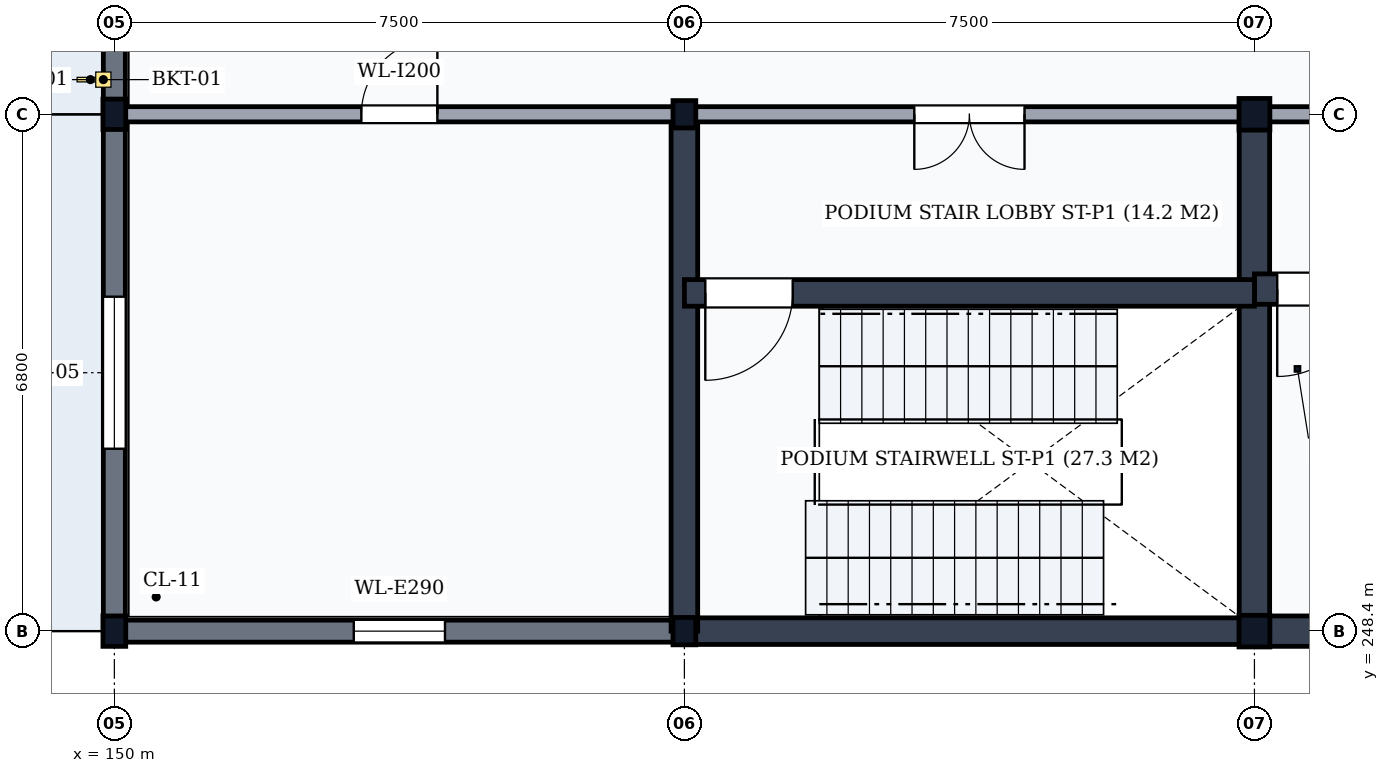
"""IFC4 building model, lengths in metres.
Left out: names, types, materials, properties, quantities, classifications, styles, units other than length and angle.
Written with IfcOpenShell. Run it as: python <this file> out.ifc"""

import sys

from ifc_helpers import new_model, si_unit, direction, frame, frame_2d, origin, origin_2d, place, context, subcontext, project, spatial, rectangle, i_section, extrude, element, fill, save


model = new_model("IFC4")
c1 = context("Model", 3, precision=1e-05, world=origin(), true_north=direction((0.0, 1.0)))
c2 = subcontext(c1, "Body", "Model", "MODEL_VIEW")
j1 = project(units=[si_unit("LENGTHUNIT", "METRE"), si_unit("PLANEANGLEUNIT", "RADIAN")], contexts=[c1])
p1 = place(None, origin())
s1 = spatial("IfcSite", under=j1, at=p1, CompositionType="ELEMENT")
p2 = place(p1, origin())
s2 = spatial("IfcBuilding", under=s1, at=p2, CompositionType="ELEMENT")
p3 = place(p2, frame((0.0, 0.0, 10.5)))
s3 = spatial("IfcBuildingStorey", under=s2, at=p3, CompositionType="ELEMENT", Elevation=10.5)
for number, where, z_axis, x_axis in (
    (1, (150.0, 248.4, 0.0), (0.0, 0.0, 1.0), (1.0, 0.0, 0.0)),
    (2, (150.0, 255.2, 0.0), (0.0, 0.0, 1.0), (1.0, 0.0, 0.0)),
):
    element("IfcColumn", number, at=place(p3, frame(where, z_axis=z_axis, x_axis=x_axis)), inside=s3, PredefinedType="COLUMN", context=c2, shape_type="SweptSolid", body=[
        extrude(i_section(OverallWidth=0.3, OverallDepth=0.4, WebThickness=0.013, FlangeThickness=0.024, FilletRadius=0.027, at=origin_2d()), origin(), (0.0, 0.0, 1.0), 5.1),
    ])
for number, where, z_axis, x_axis in (
    (3, (157.5, 248.4, 0.0), (0.0, 0.0, 1.0), (1.0, 0.0, 0.0)),
    (4, (157.5, 255.2, 0.0), (0.0, 0.0, 1.0), (1.0, 0.0, 0.0)),
):
    element("IfcColumn", number, at=place(p3, frame(where, z_axis=z_axis, x_axis=x_axis)), inside=s3, PredefinedType="COLUMN", context=c2, shape_type="SweptSolid", body=[
        extrude(i_section(OverallWidth=0.3, OverallDepth=0.36, WebThickness=0.012, FlangeThickness=0.022, FilletRadius=0.027, at=origin_2d()), origin(), (0.0, 0.0, 1.0), 5.1),
    ])
for number, where, z_axis, x_axis in (
    (5, (165.0, 248.4, 0.0), (0.0, 0.0, 1.0), (1.0, 0.0, 0.0)),
    (6, (165.0, 255.2, 0.0), (0.0, 0.0, 1.0), (1.0, 0.0, 0.0)),
):
    element("IfcColumn", number, at=place(p3, frame(where, z_axis=z_axis, x_axis=x_axis)), inside=s3, PredefinedType="COLUMN", context=c2, shape_type="SweptSolid", body=[
        extrude(i_section(OverallWidth=0.406, OverallDepth=0.416, WebThickness=0.03, FlangeThickness=0.048, FilletRadius=0.015, at=origin_2d()), origin(), (0.0, 0.0, 1.0), 5.1),
    ])
p4 = place(p3, frame((150.006, 248.4, 0.0), z_axis=(0.0, 0.0, 1.0), x_axis=(1.0, 0.0, 0.0)))
e7 = element("IfcWall", 7, at=p4, inside=s3, PredefinedType="SOLIDWALL", context=c2, shape_type="SweptSolid", body=[
    extrude(rectangle(XDim=7.488, YDim=0.29, at=frame_2d((3.744, 0.0))), origin(), (0.0, 0.0, 1.0), 4.568),
])
p5 = place(p4, frame((3.144, 0.0, 0.95)))
e8 = element("IfcOpeningElement", 8, at=p5, cuts=e7, PredefinedType="OPENING", context=c2, shape_type="SweptSolid", body=[
    extrude(rectangle(XDim=1.2, YDim=1.8, at=frame_2d((0.6, 0.9))), frame((0.0, 0.16, 0.0), z_axis=(0.0, -1.0, 0.0), x_axis=(1.0, 0.0, 0.0)), (0.0, 0.0, 1.0), 0.32),
])
p6 = place(p3, frame((150.0, 248.406, 0.0), z_axis=(0.0, 0.0, 1.0), x_axis=(0.0, 1.0, 0.0)))
e9 = element("IfcWall", 9, at=p6, inside=s3, PredefinedType="SOLIDWALL", context=c2, shape_type="SweptSolid", body=[
    extrude(rectangle(XDim=6.788, YDim=0.29, at=frame_2d((3.394, 0.0))), origin(), (0.0, 0.0, 1.0), 4.618),
])
p7 = place(p6, frame((2.394, 0.0, 0.95)))
e10 = element("IfcOpeningElement", 10, at=p7, cuts=e9, PredefinedType="OPENING", context=c2, shape_type="SweptSolid", body=[
    extrude(rectangle(XDim=2.0, YDim=2.6, at=frame_2d((1.0, 1.3))), frame((0.0, 0.16, 0.0), z_axis=(0.0, -1.0, 0.0), x_axis=(1.0, 0.0, 0.0)), (0.0, 0.0, 1.0), 0.32),
])
p8 = place(p3, frame((150.0, 255.206, 0.0), z_axis=(0.0, 0.0, 1.0), x_axis=(0.0, 1.0, 0.0)))
e11 = element("IfcWall", 11, at=p8, inside=s3, PredefinedType="SOLIDWALL", context=c2, shape_type="SweptSolid", body=[
    extrude(rectangle(XDim=7.588, YDim=0.29, at=frame_2d((3.794, 0.0))), origin(), (0.0, 0.0, 1.0), 4.578),
])
p9 = place(p8, frame((4.166, 0.0, 0.95)))
e12 = element("IfcOpeningElement", 12, at=p9, cuts=e11, PredefinedType="OPENING", context=c2, shape_type="SweptSolid", body=[
    extrude(rectangle(XDim=1.8, YDim=2.6, at=frame_2d((0.9, 1.3))), frame((0.0, 0.16, 0.0), z_axis=(0.0, -1.0, 0.0), x_axis=(1.0, 0.0, 0.0)), (0.0, 0.0, 1.0), 0.32),
])
p10 = place(p3, frame((150.1, 248.5, 5.1), z_axis=(0.0, 0.0, 1.0), x_axis=(1.0, 0.0, 0.0)))
e13 = element("IfcWall", 13, at=p10, inside=s3, PredefinedType="PARAPET", context=c2, shape_type="SweptSolid", body=[
    extrude(rectangle(XDim=7.3, YDim=0.18, at=frame_2d((3.65, 0.0))), origin(), (0.0, 0.0, 1.0), 1.2),
])
p11 = place(p3, frame((150.1, 248.6, 5.1), z_axis=(0.0, 0.0, 1.0), x_axis=(0.0, 1.0, 0.0)))
e14 = element("IfcWall", 14, at=p11, inside=s3, PredefinedType="PARAPET", context=c2, shape_type="SweptSolid", body=[
    extrude(rectangle(XDim=74.8, YDim=0.18, at=frame_2d((37.4, 0.0))), origin(), (0.0, 0.0, 1.0), 1.2),
])
p12 = place(p3, frame((165.0, 248.4, 0.0), z_axis=(0.0, 0.0, 1.0), x_axis=(1.0, 0.0, 0.0)))
e15 = element("IfcWall", 15, at=p12, inside=s3, PredefinedType="SHEAR", context=c2, shape_type="SweptSolid", body=[
    extrude(rectangle(XDim=8.0, YDim=0.4, at=frame_2d((4.0, 0.0))), origin(), (0.0, 0.0, 1.0), 4.84),
])
p13 = place(p3, frame((165.0, 248.4, 0.0), z_axis=(0.0, 0.0, 1.0), x_axis=(0.0, 1.0, 0.0)))
e16 = element("IfcWall", 16, at=p13, inside=s3, PredefinedType="SHEAR", context=c2, shape_type="SweptSolid", body=[
    extrude(rectangle(XDim=6.8, YDim=0.4, at=frame_2d((3.4, 0.0))), origin(), (0.0, 0.0, 1.0), 4.84),
])
p14 = place(p3, frame((165.0, 252.9, 0.0), z_axis=(0.0, 0.0, 1.0), x_axis=(1.0, 0.0, 0.0)))
e17 = element("IfcWall", 17, at=p14, inside=s3, PredefinedType="SHEAR", context=c2, shape_type="SweptSolid", body=[
    extrude(rectangle(XDim=8.0, YDim=0.4, at=frame_2d((4.0, 0.0))), origin(), (0.0, 0.0, 1.0), 4.84),
])
p15 = place(p14, frame((0.3, 0.0, 0.0)))
e18 = element("IfcOpeningElement", 18, at=p15, cuts=e17, PredefinedType="OPENING", context=c2, shape_type="SweptSolid", body=[
    extrude(rectangle(XDim=1.15, YDim=2.15, at=frame_2d((0.575, 1.075))), frame((0.0, 0.215, 0.0), z_axis=(0.0, -1.0, 0.0), x_axis=(1.0, 0.0, 0.0)), (0.0, 0.0, 1.0), 0.43),
])
p16 = place(p3, frame((165.0, 255.2, 0.0), z_axis=(0.0, 0.0, 1.0), x_axis=(1.0, 0.0, 0.0)))
e19 = element("IfcWall", 19, at=p16, inside=s3, PredefinedType="PARTITIONING", context=c2, shape_type="SweptSolid", body=[
    extrude(rectangle(XDim=8.0, YDim=0.2, at=frame_2d((4.0, 0.0))), origin(), (0.0, 0.0, 1.0), 4.338),
])
p17 = place(p16, frame((3.275, 0.0, 0.0)))
e20 = element("IfcOpeningElement", 20, at=p17, cuts=e19, PredefinedType="OPENING", context=c2, shape_type="SweptSolid", body=[
    extrude(rectangle(XDim=1.45, YDim=2.2, at=frame_2d((0.725, 1.1))), frame((0.0, 0.115, 0.0), z_axis=(0.0, -1.0, 0.0), x_axis=(1.0, 0.0, 0.0)), (0.0, 0.0, 1.0), 0.23),
])
p18 = place(p3, frame((157.5, 248.4, 0.0), z_axis=(0.0, 0.0, 1.0), x_axis=(1.0, 0.0, 0.0)))
e21 = element("IfcWall", 21, at=p18, inside=s3, PredefinedType="SHEAR", context=c2, shape_type="SweptSolid", body=[
    extrude(rectangle(XDim=7.5, YDim=0.35, at=frame_2d((3.75, 0.0))), origin(), (0.0, 0.0, 1.0), 4.84),
])
p19 = place(p3, frame((157.5, 248.4, 0.0), z_axis=(0.0, 0.0, 1.0), x_axis=(0.0, 1.0, 0.0)))
e22 = element("IfcWall", 22, at=p19, inside=s3, PredefinedType="SHEAR", context=c2, shape_type="SweptSolid", body=[
    extrude(rectangle(XDim=6.8, YDim=0.35, at=frame_2d((3.4, 0.0))), origin(), (0.0, 0.0, 1.0), 4.84),
])
p20 = place(p3, frame((157.5, 252.85, 0.0), z_axis=(0.0, 0.0, 1.0), x_axis=(1.0, 0.0, 0.0)))
e23 = element("IfcWall", 23, at=p20, inside=s3, PredefinedType="SHEAR", context=c2, shape_type="SweptSolid", body=[
    extrude(rectangle(XDim=7.5, YDim=0.35, at=frame_2d((3.75, 0.0))), origin(), (0.0, 0.0, 1.0), 4.84),
])
p21 = place(p20, frame((0.275, 0.0, 0.0)))
e24 = element("IfcOpeningElement", 24, at=p21, cuts=e23, PredefinedType="OPENING", context=c2, shape_type="SweptSolid", body=[
    extrude(rectangle(XDim=1.15, YDim=2.15, at=frame_2d((0.575, 1.075))), frame((0.0, 0.19, 0.0), z_axis=(0.0, -1.0, 0.0), x_axis=(1.0, 0.0, 0.0)), (0.0, 0.0, 1.0), 0.38),
])
p22 = place(p3, frame((157.5, 255.2, 0.0), z_axis=(0.0, 0.0, 1.0), x_axis=(1.0, 0.0, 0.0)))
e25 = element("IfcWall", 25, at=p22, inside=s3, PredefinedType="PARTITIONING", context=c2, shape_type="SweptSolid", body=[
    extrude(rectangle(XDim=7.5, YDim=0.2, at=frame_2d((3.75, 0.0))), origin(), (0.0, 0.0, 1.0), 4.478),
])
p23 = place(p22, frame((3.025, 0.0, 0.0)))
e26 = element("IfcOpeningElement", 26, at=p23, cuts=e25, PredefinedType="OPENING", context=c2, shape_type="SweptSolid", body=[
    extrude(rectangle(XDim=1.45, YDim=2.2, at=frame_2d((0.725, 1.1))), frame((0.0, 0.115, 0.0), z_axis=(0.0, -1.0, 0.0), x_axis=(1.0, 0.0, 0.0)), (0.0, 0.0, 1.0), 0.23),
])
p24 = place(p3, frame((150.0, 255.2, 0.0), z_axis=(0.0, 0.0, 1.0), x_axis=(1.0, 0.0, 0.0)))
e27 = element("IfcWall", 27, at=p24, inside=s3, PredefinedType="PARTITIONING", context=c2, shape_type="SweptSolid", body=[
    extrude(rectangle(XDim=7.5, YDim=0.2, at=frame_2d((3.75, 0.0))), origin(), (0.0, 0.0, 1.0), 4.478),
])
p25 = place(p24, frame((3.25, 0.0, 0.0)))
e28 = element("IfcOpeningElement", 28, at=p25, cuts=e27, PredefinedType="OPENING", context=c2, shape_type="SweptSolid", body=[
    extrude(rectangle(XDim=1.0, YDim=2.1, at=frame_2d((0.5, 1.05))), frame((0.0, 0.115, 0.0), z_axis=(0.0, -1.0, 0.0), x_axis=(1.0, 0.0, 0.0)), (0.0, 0.0, 1.0), 0.23),
])
p26 = place(p5, origin())
e29 = element("IfcWindow", 29, at=p26, inside=s3, PartitioningType="SINGLE_PANEL", PredefinedType="WINDOW", context=c2, shape_type="SweptSolid", body=[
    extrude(rectangle(XDim=1.2, YDim=1.8, at=frame_2d((0.6, 0.9))), frame((0.0, 0.03, 0.0), z_axis=(0.0, -1.0, 0.0), x_axis=(1.0, 0.0, 0.0)), (0.0, 0.0, 1.0), 0.06),
])
fill(e8, e29)
p27 = place(p7, origin())
e30 = element("IfcWindow", 30, at=p27, inside=s3, PartitioningType="DOUBLE_PANEL_VERTICAL", PredefinedType="WINDOW", context=c2, shape_type="SweptSolid", body=[
    extrude(rectangle(XDim=2.0, YDim=2.6, at=frame_2d((1.0, 1.3))), frame((0.0, 0.03, 0.0), z_axis=(0.0, -1.0, 0.0), x_axis=(1.0, 0.0, 0.0)), (0.0, 0.0, 1.0), 0.06),
])
fill(e10, e30)
p28 = place(p15, frame((1.15, 0.0, 0.0), z_axis=(0.0, 0.0, 1.0), x_axis=(-1.0, 0.0, 0.0)))
e31 = element("IfcDoor", 31, at=p28, inside=s3, OperationType="SINGLE_SWING_RIGHT", PredefinedType="DOOR", context=c2, shape_type="SweptSolid", body=[
    extrude(rectangle(XDim=1.15, YDim=2.15, at=frame_2d((0.575, 1.075))), frame((0.0, 0.025, 0.0), z_axis=(0.0, -1.0, 0.0), x_axis=(1.0, 0.0, 0.0)), (0.0, 0.0, 1.0), 0.05),
])
fill(e18, e31)
p29 = place(p21, frame((1.15, 0.0, 0.0), z_axis=(0.0, 0.0, 1.0), x_axis=(-1.0, 0.0, 0.0)))
e32 = element("IfcDoor", 32, at=p29, inside=s3, OperationType="SINGLE_SWING_RIGHT", PredefinedType="DOOR", context=c2, shape_type="SweptSolid", body=[
    extrude(rectangle(XDim=1.15, YDim=2.15, at=frame_2d((0.575, 1.075))), frame((0.0, 0.025, 0.0), z_axis=(0.0, -1.0, 0.0), x_axis=(1.0, 0.0, 0.0)), (0.0, 0.0, 1.0), 0.05),
])
fill(e24, e32)
p30 = place(p23, frame((1.45, 0.0, 0.0), z_axis=(0.0, 0.0, 1.0), x_axis=(-1.0, 0.0, 0.0)))
e33 = element("IfcDoor", 33, at=p30, inside=s3, OperationType="DOUBLE_DOOR_SINGLE_SWING", PredefinedType="DOOR", context=c2, shape_type="SweptSolid", body=[
    extrude(rectangle(XDim=1.45, YDim=2.2, at=frame_2d((0.725, 1.1))), frame((0.0, 0.025, 0.0), z_axis=(0.0, -1.0, 0.0), x_axis=(1.0, 0.0, 0.0)), (0.0, 0.0, 1.0), 0.05),
])
fill(e26, e33)
p31 = place(p25, frame((1.0, 0.0, 0.0), z_axis=(0.0, 0.0, 1.0), x_axis=(-1.0, 0.0, 0.0)))
e34 = element("IfcDoor", 34, at=p31, inside=s3, OperationType="SINGLE_SWING_LEFT", PredefinedType="DOOR", context=c2, shape_type="SweptSolid", body=[
    extrude(rectangle(XDim=1.0, YDim=2.1, at=frame_2d((0.5, 1.05))), frame((0.0, 0.025, 0.0), z_axis=(0.0, -1.0, 0.0), x_axis=(1.0, 0.0, 0.0)), (0.0, 0.0, 1.0), 0.05),
])
fill(e28, e34)
save(model, sys.argv[1])
